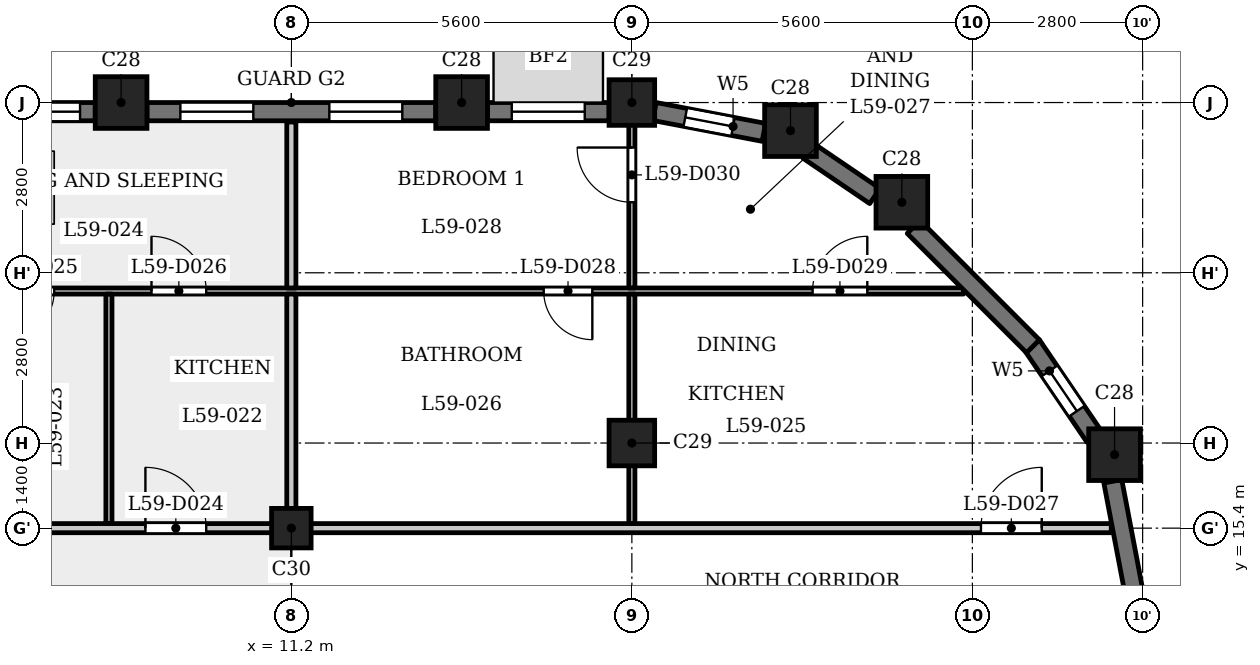
"""IFC4 building model, lengths in metres.
Left out: names, types, materials, properties, quantities, classifications, styles, units other than length and angle.
Written with IfcOpenShell. Run it as: python <this file> out.ifc"""

import sys

from ifc_helpers import new_model, si_unit, direction, frame, frame_2d, origin, origin_2d, place, context, subcontext, project, spatial, rectangle, extrude, element, fill, save


model = new_model("IFC4")
c1 = context("Model", 3, precision=1e-05, world=origin(), true_north=direction((0.0, 1.0)))
c2 = subcontext(c1, "Body", "Model", "MODEL_VIEW")
j1 = project(units=[si_unit("LENGTHUNIT", "METRE"), si_unit("PLANEANGLEUNIT", "RADIAN")], contexts=[c1])
p1 = place(None, origin())
s1 = spatial("IfcSite", under=j1, at=p1, CompositionType="ELEMENT")
p2 = place(p1, origin())
s2 = spatial("IfcBuilding", under=s1, at=p2, CompositionType="ELEMENT")
p3 = place(p2, frame((0.0, 0.0, 227.4)))
s3 = spatial("IfcBuildingStorey", under=s2, at=p3, CompositionType="ELEMENT", Elevation=227.4)
for number, where, z_axis, x_axis in (
    (1, (24.738, 16.609, 0.0), (0.0, 0.0, 1.0), (1.0, 0.0, 0.0)),
    (2, (21.24, 20.76, 0.0), (0.0, 0.0, 1.0), (1.0, 0.0, 0.0)),
    (3, (19.409, 21.938, 0.0), (0.0, 0.0, 1.0), (1.0, 0.0, 0.0)),
    (4, (14.0, 22.4, 0.0), (0.0, 0.0, 1.0), (1.0, 0.0, 0.0)),
    (5, (8.4, 22.4, 0.0), (0.0, 0.0, 1.0), (1.0, 0.0, 0.0)),
):
    element("IfcColumn", number, at=place(p3, frame(where, z_axis=z_axis, x_axis=x_axis)), inside=s3, PredefinedType="COLUMN", context=c2, shape_type="SweptSolid", body=[
        extrude(rectangle(XDim=0.85, YDim=0.85, at=origin_2d()), origin(), (0.0, 0.0, 1.0), 3.5),
    ])
for number, where, z_axis, x_axis in (
    (6, (16.8, 16.8, 0.0), (0.0, 0.0, 1.0), (1.0, 0.0, 0.0)),
    (7, (16.8, 22.4, 0.0), (0.0, 0.0, 1.0), (1.0, 0.0, 0.0)),
):
    element("IfcColumn", number, at=place(p3, frame(where, z_axis=z_axis, x_axis=x_axis)), inside=s3, PredefinedType="COLUMN", context=c2, shape_type="SweptSolid", body=[
        extrude(rectangle(XDim=0.75, YDim=0.75, at=origin_2d()), origin(), (0.0, 0.0, 1.0), 3.5),
    ])
p4 = place(p3, frame((11.2, 15.4, 0.0), z_axis=(0.0, 0.0, 1.0), x_axis=(1.0, 0.0, 0.0)))
e8 = element("IfcColumn", 8, at=p4, inside=s3, PredefinedType="COLUMN", context=c2, shape_type="SweptSolid", body=[
    extrude(rectangle(XDim=0.65, YDim=0.65, at=origin_2d()), origin(), (0.0, 0.0, 1.0), 3.5),
])
p5 = place(p3, frame((25.053, 14.372, 0.0), z_axis=(0.0, 0.0, 1.0), x_axis=(-0.187442908742, 0.982275499014, 0.0)))
e9 = element("IfcWall", 9, at=p5, inside=s3, PredefinedType="SOLIDWALL", context=c2, shape_type="SweptSolid", body=[
    extrude(rectangle(XDim=1.831, YDim=0.3, at=frame_2d((0.916, 0.0))), origin(), (0.0, 0.0, 1.0), 2.45),
])
p6 = place(p3, frame((24.408, 16.898, 0.0), z_axis=(0.0, 0.0, 1.0), x_axis=(-0.562062033417, 0.827095079535, 0.0)))
e10 = element("IfcWall", 10, at=p6, inside=s3, PredefinedType="SOLIDWALL", context=c2, shape_type="SweptSolid", body=[
    extrude(rectangle(XDim=1.831, YDim=0.3, at=frame_2d((0.916, 0.0))), origin(), (0.0, 0.0, 1.0), 2.45),
])
p7 = place(p6, frame((0.516, 0.0, 0.6)))
e11 = element("IfcOpeningElement", 11, at=p7, cuts=e10, PredefinedType="OPENING", context=c2, shape_type="SweptSolid", body=[
    extrude(rectangle(XDim=0.8, YDim=1.55, at=frame_2d((0.4, 0.775))), frame((0.0, 0.16, 0.0), z_axis=(0.0, -1.0, 0.0), x_axis=(1.0, 0.0, 0.0)), (0.0, 0.0, 1.0), 0.32),
])
p8 = place(p3, frame((23.397, 18.391, 0.0), z_axis=(0.0, 0.0, 1.0), x_axis=(-0.707106781187, 0.707106781187, 0.0)))
e12 = element("IfcWall", 12, at=p8, inside=s3, PredefinedType="SOLIDWALL", context=c2, shape_type="SweptSolid", body=[
    extrude(rectangle(XDim=2.775, YDim=0.3, at=frame_2d((1.388, 0.0))), origin(), (0.0, 0.0, 1.0), 2.45),
])
p9 = place(p3, frame((20.796, 20.862, 0.0), z_axis=(0.0, 0.0, 1.0), x_axis=(-0.827035970432, 0.562149004813, 0.0)))
e13 = element("IfcWall", 13, at=p9, inside=s3, PredefinedType="SOLIDWALL", context=c2, shape_type="SweptSolid", body=[
    extrude(rectangle(XDim=1.327, YDim=0.3, at=frame_2d((0.664, 0.0))), origin(), (0.0, 0.0, 1.0), 2.45),
])
p10 = place(p3, frame((18.971, 21.91, 0.0), z_axis=(0.0, 0.0, 1.0), x_axis=(-0.982300037503, 0.187314271538, 0.0)))
e14 = element("IfcWall", 14, at=p10, inside=s3, PredefinedType="SOLIDWALL", context=c2, shape_type="SweptSolid", body=[
    extrude(rectangle(XDim=1.831, YDim=0.3, at=frame_2d((0.916, 0.0))), origin(), (0.0, 0.0, 1.0), 2.45),
])
p11 = place(p10, frame((0.516, 0.0, 0.6)))
e15 = element("IfcOpeningElement", 15, at=p11, cuts=e14, PredefinedType="OPENING", context=c2, shape_type="SweptSolid", body=[
    extrude(rectangle(XDim=0.8, YDim=1.55, at=frame_2d((0.4, 0.775))), frame((0.0, 0.16, 0.0), z_axis=(0.0, -1.0, 0.0), x_axis=(1.0, 0.0, 0.0)), (0.0, 0.0, 1.0), 0.32),
])
p12 = place(p3, frame((16.425, 22.25, 0.0), z_axis=(0.0, 0.0, 1.0), x_axis=(-1.0, 0.0, 0.0)))
e16 = element("IfcWall", 16, at=p12, inside=s3, PredefinedType="SOLIDWALL", context=c2, shape_type="SweptSolid", body=[
    extrude(rectangle(XDim=2.0, YDim=0.3, at=frame_2d((1.0, 0.0))), origin(), (0.0, 0.0, 1.0), 2.45),
])
p13 = place(p12, frame((0.4, 0.0, 0.6)))
e17 = element("IfcOpeningElement", 17, at=p13, cuts=e16, PredefinedType="OPENING", context=c2, shape_type="SweptSolid", body=[
    extrude(rectangle(XDim=1.2, YDim=1.55, at=frame_2d((0.6, 0.775))), frame((0.0, 0.16, 0.0), z_axis=(0.0, -1.0, 0.0), x_axis=(1.0, 0.0, 0.0)), (0.0, 0.0, 1.0), 0.32),
])
p14 = place(p3, frame((13.575, 22.25, 0.0), z_axis=(0.0, 0.0, 1.0), x_axis=(-1.0, 0.0, 0.0)))
e18 = element("IfcWall", 18, at=p14, inside=s3, PredefinedType="SOLIDWALL", context=c2, shape_type="SweptSolid", body=[
    extrude(rectangle(XDim=4.75, YDim=0.3, at=frame_2d((2.375, 0.0))), origin(), (0.0, 0.0, 1.0), 2.45),
])
p15 = place(p14, frame((0.55, 0.0, 0.6)))
e19 = element("IfcOpeningElement", 19, at=p15, cuts=e18, PredefinedType="OPENING", context=c2, shape_type="SweptSolid", body=[
    extrude(rectangle(XDim=1.2, YDim=1.55, at=frame_2d((0.6, 0.775))), frame((0.0, 0.16, 0.0), z_axis=(0.0, -1.0, 0.0), x_axis=(1.0, 0.0, 0.0)), (0.0, 0.0, 1.0), 0.32),
])
p16 = place(p14, frame((3.0, 0.0, 0.6)))
e20 = element("IfcOpeningElement", 20, at=p16, cuts=e18, PredefinedType="OPENING", context=c2, shape_type="SweptSolid", body=[
    extrude(rectangle(XDim=1.2, YDim=1.55, at=frame_2d((0.6, 0.775))), frame((0.0, 0.16, 0.0), z_axis=(0.0, -1.0, 0.0), x_axis=(1.0, 0.0, 0.0)), (0.0, 0.0, 1.0), 0.32),
])
p17 = place(p3, frame((7.975, 22.25, 0.0), z_axis=(0.0, 0.0, 1.0), x_axis=(-1.0, 0.0, 0.0)))
e21 = element("IfcWall", 21, at=p17, inside=s3, PredefinedType="SOLIDWALL", context=c2, shape_type="SweptSolid", body=[
    extrude(rectangle(XDim=4.75, YDim=0.3, at=frame_2d((2.375, 0.0))), origin(), (0.0, 0.0, 1.0), 2.45),
])
p18 = place(p17, frame((0.25, 0.0, 0.9)))
e22 = element("IfcOpeningElement", 22, at=p18, cuts=e21, PredefinedType="OPENING", context=c2, shape_type="SweptSolid", body=[
    extrude(rectangle(XDim=1.8, YDim=1.25, at=frame_2d((0.9, 0.625))), frame((0.0, 0.16, 0.0), z_axis=(0.0, -1.0, 0.0), x_axis=(1.0, 0.0, 0.0)), (0.0, 0.0, 1.0), 0.32),
])
p19 = place(p17, frame((3.0, 0.0, 0.6)))
e23 = element("IfcOpeningElement", 23, at=p19, cuts=e21, PredefinedType="OPENING", context=c2, shape_type="SweptSolid", body=[
    extrude(rectangle(XDim=1.2, YDim=1.55, at=frame_2d((0.6, 0.775))), frame((0.0, 0.16, 0.0), z_axis=(0.0, -1.0, 0.0), x_axis=(1.0, 0.0, 0.0)), (0.0, 0.0, 1.0), 0.32),
])
p20 = place(p3, frame((-24.684, 15.4, 0.0), z_axis=(0.0, 0.0, 1.0), x_axis=(1.0, 0.0, 0.0)))
e24 = element("IfcWall", 24, at=p20, inside=s3, PredefinedType="PARTITIONING", context=c2, shape_type="SweptSolid", body=[
    extrude(rectangle(XDim=49.368, YDim=0.15, at=frame_2d((24.684, 0.0))), origin(), (0.0, 0.0, 1.0), 3.15),
])
p21 = place(p20, frame((6.234, 0.0, 0.0)))
e25 = element("IfcOpeningElement", 25, at=p21, cuts=e24, PredefinedType="OPENING", context=c2, shape_type="SweptSolid", body=[
    extrude(rectangle(XDim=1.0, YDim=2.1, at=frame_2d((0.5, 1.05))), frame((0.0, 0.085, 0.0), z_axis=(0.0, -1.0, 0.0), x_axis=(1.0, 0.0, 0.0)), (0.0, 0.0, 1.0), 0.17),
])
p22 = place(p20, frame((17.434, 0.0, 0.0)))
e26 = element("IfcOpeningElement", 26, at=p22, cuts=e24, PredefinedType="OPENING", context=c2, shape_type="SweptSolid", body=[
    extrude(rectangle(XDim=1.0, YDim=2.1, at=frame_2d((0.5, 1.05))), frame((0.0, 0.085, 0.0), z_axis=(0.0, -1.0, 0.0), x_axis=(1.0, 0.0, 0.0)), (0.0, 0.0, 1.0), 0.17),
])
p23 = place(p20, frame((25.384, 0.0, 0.0)))
e27 = element("IfcOpeningElement", 27, at=p23, cuts=e24, PredefinedType="OPENING", context=c2, shape_type="SweptSolid", body=[
    extrude(rectangle(XDim=1.0, YDim=2.1, at=frame_2d((0.5, 1.05))), frame((0.0, 0.085, 0.0), z_axis=(0.0, -1.0, 0.0), x_axis=(1.0, 0.0, 0.0)), (0.0, 0.0, 1.0), 0.17),
])
p24 = place(p20, frame((33.484, 0.0, 0.0)))
e28 = element("IfcOpeningElement", 28, at=p24, cuts=e24, PredefinedType="OPENING", context=c2, shape_type="SweptSolid", body=[
    extrude(rectangle(XDim=1.0, YDim=2.1, at=frame_2d((0.5, 1.05))), frame((0.0, 0.085, 0.0), z_axis=(0.0, -1.0, 0.0), x_axis=(1.0, 0.0, 0.0)), (0.0, 0.0, 1.0), 0.17),
])
p25 = place(p20, frame((47.225, 0.0, 0.0)))
e29 = element("IfcOpeningElement", 29, at=p25, cuts=e24, PredefinedType="OPENING", context=c2, shape_type="SweptSolid", body=[
    extrude(rectangle(XDim=1.0, YDim=2.1, at=frame_2d((0.5, 1.05))), frame((0.0, 0.085, 0.0), z_axis=(0.0, -1.0, 0.0), x_axis=(1.0, 0.0, 0.0)), (0.0, 0.0, 1.0), 0.17),
])
p26 = place(p3, frame((-22.256, 19.3, 0.0), z_axis=(0.0, 0.0, 1.0), x_axis=(1.0, 0.0, 0.0)))
e30 = element("IfcWall", 30, at=p26, inside=s3, PredefinedType="PARTITIONING", context=c2, shape_type="SweptSolid", body=[
    extrude(rectangle(XDim=44.511, YDim=0.1, at=frame_2d((22.256, 0.0))), origin(), (0.0, 0.0, 1.0), 3.15),
])
p27 = place(p26, frame((9.606, 0.0, 0.0)))
e31 = element("IfcOpeningElement", 31, at=p27, cuts=e30, PredefinedType="OPENING", context=c2, shape_type="SweptSolid", body=[
    extrude(rectangle(XDim=0.8, YDim=2.1, at=frame_2d((0.4, 1.05))), frame((0.0, 0.06, 0.0), z_axis=(0.0, -1.0, 0.0), x_axis=(1.0, 0.0, 0.0)), (0.0, 0.0, 1.0), 0.12),
])
p28 = place(p26, frame((3.906, 0.0, 0.0)))
e32 = element("IfcOpeningElement", 32, at=p28, cuts=e30, PredefinedType="OPENING", context=c2, shape_type="SweptSolid", body=[
    extrude(rectangle(XDim=0.9, YDim=2.1, at=frame_2d((0.45, 1.05))), frame((0.0, 0.06, 0.0), z_axis=(0.0, -1.0, 0.0), x_axis=(1.0, 0.0, 0.0)), (0.0, 0.0, 1.0), 0.12),
])
p29 = place(p26, frame((11.706, 0.0, 0.0)))
e33 = element("IfcOpeningElement", 33, at=p29, cuts=e30, PredefinedType="OPENING", context=c2, shape_type="SweptSolid", body=[
    extrude(rectangle(XDim=0.8, YDim=2.1, at=frame_2d((0.4, 1.05))), frame((0.0, 0.06, 0.0), z_axis=(0.0, -1.0, 0.0), x_axis=(1.0, 0.0, 0.0)), (0.0, 0.0, 1.0), 0.12),
])
p30 = place(p26, frame((15.106, 0.0, 0.0)))
e34 = element("IfcOpeningElement", 34, at=p30, cuts=e30, PredefinedType="OPENING", context=c2, shape_type="SweptSolid", body=[
    extrude(rectangle(XDim=0.9, YDim=2.1, at=frame_2d((0.45, 1.05))), frame((0.0, 0.06, 0.0), z_axis=(0.0, -1.0, 0.0), x_axis=(1.0, 0.0, 0.0)), (0.0, 0.0, 1.0), 0.12),
])
p31 = place(p26, frame((17.556, 0.0, 0.0)))
e35 = element("IfcOpeningElement", 35, at=p31, cuts=e30, PredefinedType="OPENING", context=c2, shape_type="SweptSolid", body=[
    extrude(rectangle(XDim=0.8, YDim=2.1, at=frame_2d((0.4, 1.05))), frame((0.0, 0.06, 0.0), z_axis=(0.0, -1.0, 0.0), x_axis=(1.0, 0.0, 0.0)), (0.0, 0.0, 1.0), 0.12),
])
p32 = place(p26, frame((19.956, 0.0, 0.0)))
e36 = element("IfcOpeningElement", 36, at=p32, cuts=e30, PredefinedType="OPENING", context=c2, shape_type="SweptSolid", body=[
    extrude(rectangle(XDim=0.9, YDim=2.1, at=frame_2d((0.45, 1.05))), frame((0.0, 0.06, 0.0), z_axis=(0.0, -1.0, 0.0), x_axis=(1.0, 0.0, 0.0)), (0.0, 0.0, 1.0), 0.12),
])
p33 = place(p26, frame((23.456, 0.0, 0.0)))
e37 = element("IfcOpeningElement", 37, at=p33, cuts=e30, PredefinedType="OPENING", context=c2, shape_type="SweptSolid", body=[
    extrude(rectangle(XDim=0.9, YDim=2.1, at=frame_2d((0.45, 1.05))), frame((0.0, 0.06, 0.0), z_axis=(0.0, -1.0, 0.0), x_axis=(1.0, 0.0, 0.0)), (0.0, 0.0, 1.0), 0.12),
])
p34 = place(p26, frame((26.056, 0.0, 0.0)))
e38 = element("IfcOpeningElement", 38, at=p34, cuts=e30, PredefinedType="OPENING", context=c2, shape_type="SweptSolid", body=[
    extrude(rectangle(XDim=0.9, YDim=2.1, at=frame_2d((0.45, 1.05))), frame((0.0, 0.06, 0.0), z_axis=(0.0, -1.0, 0.0), x_axis=(1.0, 0.0, 0.0)), (0.0, 0.0, 1.0), 0.12),
])
p35 = place(p26, frame((28.756, 0.0, 0.0)))
e39 = element("IfcOpeningElement", 39, at=p35, cuts=e30, PredefinedType="OPENING", context=c2, shape_type="SweptSolid", body=[
    extrude(rectangle(XDim=0.8, YDim=2.1, at=frame_2d((0.4, 1.05))), frame((0.0, 0.06, 0.0), z_axis=(0.0, -1.0, 0.0), x_axis=(1.0, 0.0, 0.0)), (0.0, 0.0, 1.0), 0.12),
])
p36 = place(p26, frame((31.156, 0.0, 0.0)))
e40 = element("IfcOpeningElement", 40, at=p36, cuts=e30, PredefinedType="OPENING", context=c2, shape_type="SweptSolid", body=[
    extrude(rectangle(XDim=0.9, YDim=2.1, at=frame_2d((0.45, 1.05))), frame((0.0, 0.06, 0.0), z_axis=(0.0, -1.0, 0.0), x_axis=(1.0, 0.0, 0.0)), (0.0, 0.0, 1.0), 0.12),
])
p37 = place(p26, frame((37.606, 0.0, 0.0)))
e41 = element("IfcOpeningElement", 41, at=p37, cuts=e30, PredefinedType="OPENING", context=c2, shape_type="SweptSolid", body=[
    extrude(rectangle(XDim=0.8, YDim=2.1, at=frame_2d((0.4, 1.05))), frame((0.0, 0.06, 0.0), z_axis=(0.0, -1.0, 0.0), x_axis=(1.0, 0.0, 0.0)), (0.0, 0.0, 1.0), 0.12),
])
p38 = place(p26, frame((42.028, 0.0, 0.0)))
e42 = element("IfcOpeningElement", 42, at=p38, cuts=e30, PredefinedType="OPENING", context=c2, shape_type="SweptSolid", body=[
    extrude(rectangle(XDim=0.9, YDim=2.1, at=frame_2d((0.45, 1.05))), frame((0.0, 0.06, 0.0), z_axis=(0.0, -1.0, 0.0), x_axis=(1.0, 0.0, 0.0)), (0.0, 0.0, 1.0), 0.12),
])
p39 = place(p3, frame((8.2, 15.475, 0.0), z_axis=(0.0, 0.0, 1.0), x_axis=(0.0, 1.0, 0.0)))
e43 = element("IfcWall", 43, at=p39, inside=s3, PredefinedType="PARTITIONING", context=c2, shape_type="SweptSolid", body=[
    extrude(rectangle(XDim=3.775, YDim=0.1, at=frame_2d((1.887, 0.0))), origin(), (0.0, 0.0, 1.0), 3.15),
])
p40 = place(p3, frame((11.2, 15.475, 0.0), z_axis=(0.0, 0.0, 1.0), x_axis=(0.0, 1.0, 0.0)))
e44 = element("IfcWall", 44, at=p40, inside=s3, PredefinedType="PARTITIONING", context=c2, shape_type="SweptSolid", body=[
    extrude(rectangle(XDim=3.775, YDim=0.15, at=frame_2d((1.887, 0.0))), origin(), (0.0, 0.0, 1.0), 3.15),
])
p41 = place(p3, frame((11.2, 19.35, 0.0), z_axis=(0.0, 0.0, 1.0), x_axis=(0.0, 1.0, 0.0)))
e45 = element("IfcWall", 45, at=p41, inside=s3, PredefinedType="PARTITIONING", context=c2, shape_type="SweptSolid", body=[
    extrude(rectangle(XDim=2.73, YDim=0.15, at=frame_2d((1.365, 0.0))), origin(), (0.0, 0.0, 1.0), 3.15),
])
p42 = place(p3, frame((16.8, 15.475, 0.0), z_axis=(0.0, 0.0, 1.0), x_axis=(0.0, 1.0, 0.0)))
e46 = element("IfcWall", 46, at=p42, inside=s3, PredefinedType="PARTITIONING", context=c2, shape_type="SweptSolid", body=[
    extrude(rectangle(XDim=3.775, YDim=0.1, at=frame_2d((1.887, 0.0))), origin(), (0.0, 0.0, 1.0), 2.5),
])
p43 = place(p3, frame((16.8, 19.35, 0.0), z_axis=(0.0, 0.0, 1.0), x_axis=(0.0, 1.0, 0.0)))
e47 = element("IfcWall", 47, at=p43, inside=s3, PredefinedType="PARTITIONING", context=c2, shape_type="SweptSolid", body=[
    extrude(rectangle(XDim=2.96, YDim=0.1, at=frame_2d((1.48, 0.0))), origin(), (0.0, 0.0, 1.0), 2.5),
])
p44 = place(p43, frame((1.41, 0.0, 0.0)))
e48 = element("IfcOpeningElement", 48, at=p44, cuts=e47, PredefinedType="OPENING", context=c2, shape_type="SweptSolid", body=[
    extrude(rectangle(XDim=0.9, YDim=2.1, at=frame_2d((0.45, 1.05))), frame((0.0, 0.06, 0.0), z_axis=(0.0, -1.0, 0.0), x_axis=(1.0, 0.0, 0.0)), (0.0, 0.0, 1.0), 0.12),
])
p45 = place(p24, origin())
e49 = element("IfcDoor", 49, at=p45, inside=s3, OperationType="SINGLE_SWING_RIGHT", PredefinedType="DOOR", context=c2, shape_type="SweptSolid", body=[
    extrude(rectangle(XDim=1.0, YDim=2.1, at=frame_2d((0.5, 1.05))), frame((0.0, 0.025, 0.0), z_axis=(0.0, -1.0, 0.0), x_axis=(1.0, 0.0, 0.0)), (0.0, 0.0, 1.0), 0.05),
])
fill(e28, e49)
p46 = place(p35, origin())
e50 = element("IfcDoor", 50, at=p46, inside=s3, OperationType="SINGLE_SWING_LEFT", PredefinedType="DOOR", context=c2, shape_type="SweptSolid", body=[
    extrude(rectangle(XDim=0.8, YDim=2.1, at=frame_2d((0.4, 1.05))), frame((0.0, 0.025, 0.0), z_axis=(0.0, -1.0, 0.0), x_axis=(1.0, 0.0, 0.0)), (0.0, 0.0, 1.0), 0.05),
])
fill(e39, e50)
p47 = place(p36, origin())
e51 = element("IfcDoor", 51, at=p47, inside=s3, OperationType="SINGLE_SWING_RIGHT", PredefinedType="DOOR", context=c2, shape_type="SweptSolid", body=[
    extrude(rectangle(XDim=0.9, YDim=2.1, at=frame_2d((0.45, 1.05))), frame((0.0, 0.025, 0.0), z_axis=(0.0, -1.0, 0.0), x_axis=(1.0, 0.0, 0.0)), (0.0, 0.0, 1.0), 0.05),
])
fill(e40, e51)
p48 = place(p25, origin())
e52 = element("IfcDoor", 52, at=p48, inside=s3, OperationType="SINGLE_SWING_LEFT", PredefinedType="DOOR", context=c2, shape_type="SweptSolid", body=[
    extrude(rectangle(XDim=1.0, YDim=2.1, at=frame_2d((0.5, 1.05))), frame((0.0, 0.025, 0.0), z_axis=(0.0, -1.0, 0.0), x_axis=(1.0, 0.0, 0.0)), (0.0, 0.0, 1.0), 0.05),
])
fill(e29, e52)
p49 = place(p37, origin())
e53 = element("IfcDoor", 53, at=p49, inside=s3, OperationType="SINGLE_SWING_RIGHT", PredefinedType="DOOR", context=c2, shape_type="SweptSolid", body=[
    extrude(rectangle(XDim=0.8, YDim=2.1, at=frame_2d((0.4, 1.05))), frame((0.0, 0.025, 0.0), z_axis=(0.0, -1.0, 0.0), x_axis=(1.0, 0.0, 0.0)), (0.0, 0.0, 1.0), 0.05),
])
fill(e41, e53)
p50 = place(p38, origin())
e54 = element("IfcDoor", 54, at=p50, inside=s3, OperationType="SINGLE_SWING_LEFT", PredefinedType="DOOR", context=c2, shape_type="SweptSolid", body=[
    extrude(rectangle(XDim=0.9, YDim=2.1, at=frame_2d((0.45, 1.05))), frame((0.0, 0.025, 0.0), z_axis=(0.0, -1.0, 0.0), x_axis=(1.0, 0.0, 0.0)), (0.0, 0.0, 1.0), 0.05),
])
fill(e42, e54)
p51 = place(p44, origin())
e55 = element("IfcDoor", 55, at=p51, inside=s3, OperationType="SINGLE_SWING_LEFT", PredefinedType="DOOR", context=c2, shape_type="SweptSolid", body=[
    extrude(rectangle(XDim=0.9, YDim=2.1, at=frame_2d((0.45, 1.05))), frame((0.0, 0.025, 0.0), z_axis=(0.0, -1.0, 0.0), x_axis=(1.0, 0.0, 0.0)), (0.0, 0.0, 1.0), 0.05),
])
fill(e48, e55)
p52 = place(p7, origin())
e56 = element("IfcWindow", 56, at=p52, inside=s3, PartitioningType="SINGLE_PANEL", PredefinedType="WINDOW", context=c2, shape_type="SweptSolid", body=[
    extrude(rectangle(XDim=0.8, YDim=1.55, at=frame_2d((0.4, 0.775))), frame((0.0, 0.03, 0.0), z_axis=(0.0, -1.0, 0.0), x_axis=(1.0, 0.0, 0.0)), (0.0, 0.0, 1.0), 0.06),
])
fill(e11, e56)
p53 = place(p11, origin())
e57 = element("IfcWindow", 57, at=p53, inside=s3, PartitioningType="SINGLE_PANEL", PredefinedType="WINDOW", context=c2, shape_type="SweptSolid", body=[
    extrude(rectangle(XDim=0.8, YDim=1.55, at=frame_2d((0.4, 0.775))), frame((0.0, 0.03, 0.0), z_axis=(0.0, -1.0, 0.0), x_axis=(1.0, 0.0, 0.0)), (0.0, 0.0, 1.0), 0.06),
])
fill(e15, e57)
p54 = place(p13, origin())
e58 = element("IfcWindow", 58, at=p54, inside=s3, PartitioningType="SINGLE_PANEL", PredefinedType="WINDOW", context=c2, shape_type="SweptSolid", body=[
    extrude(rectangle(XDim=1.2, YDim=1.55, at=frame_2d((0.6, 0.775))), frame((0.0, 0.03, 0.0), z_axis=(0.0, -1.0, 0.0), x_axis=(1.0, 0.0, 0.0)), (0.0, 0.0, 1.0), 0.06),
])
fill(e17, e58)
p55 = place(p15, origin())
e59 = element("IfcWindow", 59, at=p55, inside=s3, PartitioningType="SINGLE_PANEL", PredefinedType="WINDOW", context=c2, shape_type="SweptSolid", body=[
    extrude(rectangle(XDim=1.2, YDim=1.55, at=frame_2d((0.6, 0.775))), frame((0.0, 0.03, 0.0), z_axis=(0.0, -1.0, 0.0), x_axis=(1.0, 0.0, 0.0)), (0.0, 0.0, 1.0), 0.06),
])
fill(e19, e59)
p56 = place(p16, origin())
e60 = element("IfcWindow", 60, at=p56, inside=s3, PartitioningType="SINGLE_PANEL", PredefinedType="WINDOW", context=c2, shape_type="SweptSolid", body=[
    extrude(rectangle(XDim=1.2, YDim=1.55, at=frame_2d((0.6, 0.775))), frame((0.0, 0.03, 0.0), z_axis=(0.0, -1.0, 0.0), x_axis=(1.0, 0.0, 0.0)), (0.0, 0.0, 1.0), 0.06),
])
fill(e20, e60)
p57 = place(p18, origin())
e61 = element("IfcWindow", 61, at=p57, inside=s3, PartitioningType="SINGLE_PANEL", PredefinedType="WINDOW", context=c2, shape_type="SweptSolid", body=[
    extrude(rectangle(XDim=1.8, YDim=1.25, at=frame_2d((0.9, 0.625))), frame((0.0, 0.03, 0.0), z_axis=(0.0, -1.0, 0.0), x_axis=(1.0, 0.0, 0.0)), (0.0, 0.0, 1.0), 0.06),
])
fill(e22, e61)
save(model, sys.argv[1])
